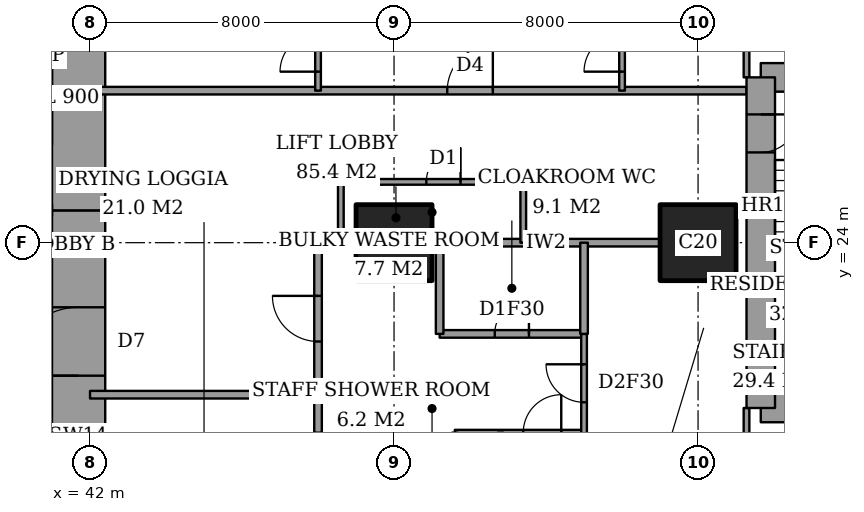
"""IFC4 building model, lengths in metres.
Left out: names, types, materials, properties, quantities, classifications, styles, units other than length and angle.
Written with IfcOpenShell. Run it as: python <this file> out.ifc"""

import sys

from ifc_helpers import new_model, si_unit, direction, frame, frame_2d, origin, origin_2d, place, context, subcontext, project, spatial, rectangle, extrude, element, fill, save


model = new_model("IFC4")
c1 = context("Model", 3, precision=1e-05, world=origin(), true_north=direction((0.0, 1.0)))
c2 = subcontext(c1, "Body", "Model", "MODEL_VIEW")
j1 = project(units=[si_unit("LENGTHUNIT", "METRE"), si_unit("PLANEANGLEUNIT", "RADIAN")], contexts=[c1])
p1 = place(None, origin())
s1 = spatial("IfcSite", under=j1, at=p1, CompositionType="ELEMENT")
p2 = place(p1, origin())
s2 = spatial("IfcBuilding", under=s1, at=p2, CompositionType="ELEMENT")
p3 = place(p2, frame((0.0, 0.0, 150.2)))
s3 = spatial("IfcBuildingStorey", under=s2, at=p3, CompositionType="ELEMENT", Elevation=150.2)
for number, where, z_axis, x_axis in (
    (1, (50.0, 24.0, 0.0), (0.0, 0.0, 1.0), (1.0, 0.0, 0.0)),
    (2, (58.0, 24.0, 0.0), (0.0, 0.0, 1.0), (1.0, 0.0, 0.0)),
):
    element("IfcColumn", number, at=place(p3, frame(where, z_axis=z_axis, x_axis=x_axis)), inside=s3, PredefinedType="COLUMN", context=c2, shape_type="SweptSolid", body=[
        extrude(rectangle(XDim=2.0, YDim=2.0, at=origin_2d()), origin(), (0.0, 0.0, 1.0), 3.6),
    ])
p4 = place(p3, frame((41.7, 13.0, 0.0), z_axis=(0.0, 0.0, 1.0), x_axis=(0.0, 1.0, 0.0)))
e3 = element("IfcWall", 3, at=p4, inside=s3, PredefinedType="SHEAR", context=c2, shape_type="SweptSolid", body=[
    extrude(rectangle(XDim=11.85, YDim=1.4, at=frame_2d((5.925, 0.0))), origin(), (0.0, 0.0, 1.0), 3.6),
])
p5 = place(p4, frame((7.5, 0.0, 0.0)))
e4 = element("IfcOpeningElement", 4, at=p5, cuts=e3, PredefinedType="OPENING", context=c2, shape_type="SweptSolid", body=[
    extrude(rectangle(XDim=1.8, YDim=2.4, at=frame_2d((0.9, 1.2))), frame((0.0, 0.71, 0.0), z_axis=(0.0, -1.0, 0.0), x_axis=(1.0, 0.0, 0.0)), (0.0, 0.0, 1.0), 1.42),
])
p6 = place(p3, frame((41.7, 24.85, 0.0), z_axis=(0.0, 0.0, 1.0), x_axis=(0.0, 1.0, 0.0)))
e5 = element("IfcWall", 5, at=p6, inside=s3, PredefinedType="SHEAR", context=c2, shape_type="SweptSolid", body=[
    extrude(rectangle(XDim=10.15, YDim=1.4, at=frame_2d((5.075, 0.0))), origin(), (0.0, 0.0, 1.0), 3.6),
])
for number, where, z_axis, x_axis in (
    (6, (59.65, 19.65, 0.0), (0.0, 0.0, 1.0), (1.0, 0.0, 0.0)),
    (7, (64.1, 28.35, 0.0), (0.0, 0.0, 1.0), (-1.0, 0.0, 0.0)),
):
    element("IfcWall", number, at=place(p3, frame(where, z_axis=z_axis, x_axis=x_axis)), inside=s3, PredefinedType="SHEAR", context=c2, shape_type="SweptSolid", body=[
        extrude(rectangle(XDim=4.45, YDim=0.75, at=frame_2d((2.225, 0.0))), origin(), (0.0, 0.0, 1.0), 3.6),
    ])
p7 = place(p3, frame((59.65, 28.35, 0.0), z_axis=(0.0, 0.0, 1.0), x_axis=(0.0, -1.0, 0.0)))
e8 = element("IfcWall", 8, at=p7, inside=s3, PredefinedType="SHEAR", context=c2, shape_type="SweptSolid", body=[
    extrude(rectangle(XDim=8.7, YDim=0.75, at=frame_2d((4.35, 0.0))), origin(), (0.0, 0.0, 1.0), 3.6),
])
p8 = place(p7, frame((0.975, 0.0, 0.0)))
e9 = element("IfcOpeningElement", 9, at=p8, cuts=e8, PredefinedType="OPENING", context=c2, shape_type="SweptSolid", body=[
    extrude(rectangle(XDim=1.0, YDim=2.1, at=frame_2d((0.5, 1.05))), frame((0.0, 0.385, 0.0), z_axis=(0.0, -1.0, 0.0), x_axis=(1.0, 0.0, 0.0)), (0.0, 0.0, 1.0), 0.77),
])
p9 = place(p3, frame((51.6, 19.0, 0.0), z_axis=(0.0, 0.0, 1.0), x_axis=(1.0, 0.0, 0.0)))
e10 = element("IfcWall", 10, at=p9, inside=s3, PredefinedType="PARTITIONING", context=c2, shape_type="SweptSolid", body=[
    extrude(rectangle(XDim=3.4, YDim=0.15, at=frame_2d((1.7, 0.0))), origin(), (0.0, 0.0, 1.0), 3.35),
])
p10 = place(p9, frame((1.8, 0.0, 0.0)))
e11 = element("IfcOpeningElement", 11, at=p10, cuts=e10, PredefinedType="OPENING", context=c2, shape_type="SweptSolid", body=[
    extrude(rectangle(XDim=1.0, YDim=2.1, at=frame_2d((0.5, 1.05))), frame((0.0, 0.085, 0.0), z_axis=(0.0, -1.0, 0.0), x_axis=(1.0, 0.0, 0.0)), (0.0, 0.0, 1.0), 0.17),
])
p11 = place(p3, frame((42.0, 20.0, 0.0), z_axis=(0.0, 0.0, 1.0), x_axis=(1.0, 0.0, 0.0)))
e12 = element("IfcWall", 12, at=p11, inside=s3, PredefinedType="PARTITIONING", context=c2, shape_type="SweptSolid", body=[
    extrude(rectangle(XDim=6.0, YDim=0.2, at=frame_2d((3.0, 0.0))), origin(), (0.0, 0.0, 1.0), 3.35),
])
p12 = place(p3, frame((51.2, 21.6, 0.0), z_axis=(0.0, 0.0, 1.0), x_axis=(1.0, 0.0, 0.0)))
e13 = element("IfcWall", 13, at=p12, inside=s3, PredefinedType="PARTITIONING", context=c2, shape_type="SweptSolid", body=[
    extrude(rectangle(XDim=3.8, YDim=0.2, at=frame_2d((1.9, 0.0))), origin(), (0.0, 0.0, 1.0), 3.35),
])
p13 = place(p12, frame((1.45, 0.0, 0.0)))
e14 = element("IfcOpeningElement", 14, at=p13, cuts=e13, PredefinedType="OPENING", context=c2, shape_type="SweptSolid", body=[
    extrude(rectangle(XDim=0.9, YDim=2.1, at=frame_2d((0.45, 1.05))), frame((0.0, 0.11, 0.0), z_axis=(0.0, -1.0, 0.0), x_axis=(1.0, 0.0, 0.0)), (0.0, 0.0, 1.0), 0.22),
])
p14 = place(p3, frame((48.0, 24.0, 0.0), z_axis=(0.0, 0.0, 1.0), x_axis=(1.0, 0.0, 0.0)))
e15 = element("IfcWall", 15, at=p14, inside=s3, PredefinedType="PARTITIONING", context=c2, shape_type="SweptSolid", body=[
    extrude(rectangle(XDim=1.0, YDim=0.2, at=frame_2d((0.5, 0.0))), origin(), (0.0, 0.0, 1.0), 3.35),
])
p15 = place(p3, frame((51.0, 24.0, 0.0), z_axis=(0.0, 0.0, 1.0), x_axis=(1.0, 0.0, 0.0)))
e16 = element("IfcWall", 16, at=p15, inside=s3, PredefinedType="PARTITIONING", context=c2, shape_type="SweptSolid", body=[
    extrude(rectangle(XDim=6.0, YDim=0.2, at=frame_2d((3.0, 0.0))), origin(), (0.0, 0.0, 1.0), 3.35),
])
p16 = place(p3, frame((48.6, 25.6, 0.0), z_axis=(0.0, 0.0, 1.0), x_axis=(1.0, 0.0, 0.0)))
e17 = element("IfcWall", 17, at=p16, inside=s3, PredefinedType="PARTITIONING", context=c2, shape_type="SweptSolid", body=[
    extrude(rectangle(XDim=4.8, YDim=0.15, at=frame_2d((2.4, 0.0))), origin(), (0.0, 0.0, 1.0), 3.35),
])
p17 = place(p16, frame((2.25, 0.0, 0.0)))
e18 = element("IfcOpeningElement", 18, at=p17, cuts=e17, PredefinedType="OPENING", context=c2, shape_type="SweptSolid", body=[
    extrude(rectangle(XDim=0.9, YDim=2.1, at=frame_2d((0.45, 1.05))), frame((0.0, 0.085, 0.0), z_axis=(0.0, -1.0, 0.0), x_axis=(1.0, 0.0, 0.0)), (0.0, 0.0, 1.0), 0.17),
])
p18 = place(p3, frame((42.0, 28.0, 0.0), z_axis=(0.0, 0.0, 1.0), x_axis=(1.0, 0.0, 0.0)))
e19 = element("IfcWall", 19, at=p18, inside=s3, PredefinedType="PARTITIONING", context=c2, shape_type="SweptSolid", body=[
    extrude(rectangle(XDim=17.275, YDim=0.2, at=frame_2d((8.637, 0.0))), origin(), (0.0, 0.0, 1.0), 3.35),
])
p19 = place(p18, frame((9.4, 0.0, 0.0)))
e20 = element("IfcOpeningElement", 20, at=p19, cuts=e19, PredefinedType="OPENING", context=c2, shape_type="SweptSolid", body=[
    extrude(rectangle(XDim=1.2, YDim=2.4, at=frame_2d((0.6, 1.2))), frame((0.0, 0.11, 0.0), z_axis=(0.0, -1.0, 0.0), x_axis=(1.0, 0.0, 0.0)), (0.0, 0.0, 1.0), 0.22),
])
p20 = place(p3, frame((48.0, 19.0, 0.0), z_axis=(0.0, 0.0, 1.0), x_axis=(0.0, 1.0, 0.0)))
e21 = element("IfcWall", 21, at=p20, inside=s3, PredefinedType="PARTITIONING", context=c2, shape_type="SweptSolid", body=[
    extrude(rectangle(XDim=5.0, YDim=0.2, at=frame_2d((2.5, 0.0))), origin(), (0.0, 0.0, 1.0), 3.35),
])
p21 = place(p20, frame((2.4, 0.0, 0.0)))
e22 = element("IfcOpeningElement", 22, at=p21, cuts=e21, PredefinedType="OPENING", context=c2, shape_type="SweptSolid", body=[
    extrude(rectangle(XDim=1.2, YDim=2.4, at=frame_2d((0.6, 1.2))), frame((0.0, 0.11, 0.0), z_axis=(0.0, -1.0, 0.0), x_axis=(1.0, 0.0, 0.0)), (0.0, 0.0, 1.0), 0.22),
])
p22 = place(p3, frame((48.0, 28.0, 0.0), z_axis=(0.0, 0.0, 1.0), x_axis=(0.0, 1.0, 0.0)))
e23 = element("IfcWall", 23, at=p22, inside=s3, PredefinedType="PARTITIONING", context=c2, shape_type="SweptSolid", body=[
    extrude(rectangle(XDim=9.2, YDim=0.15, at=frame_2d((4.6, 0.0))), origin(), (0.0, 0.0, 1.0), 3.35),
])
p23 = place(p22, frame((0.5, 0.0, 0.0)))
e24 = element("IfcOpeningElement", 24, at=p23, cuts=e23, PredefinedType="OPENING", context=c2, shape_type="SweptSolid", body=[
    extrude(rectangle(XDim=1.0, YDim=2.1, at=frame_2d((0.5, 1.05))), frame((0.0, 0.085, 0.0), z_axis=(0.0, -1.0, 0.0), x_axis=(1.0, 0.0, 0.0)), (0.0, 0.0, 1.0), 0.17),
])
p24 = place(p3, frame((48.6, 24.0, 0.0), z_axis=(0.0, 0.0, 1.0), x_axis=(0.0, 1.0, 0.0)))
e25 = element("IfcWall", 25, at=p24, inside=s3, PredefinedType="PARTITIONING", context=c2, shape_type="SweptSolid", body=[
    extrude(rectangle(XDim=1.6, YDim=0.15, at=frame_2d((0.8, 0.0))), origin(), (0.0, 0.0, 1.0), 3.35),
])
p25 = place(p3, frame((51.2, 21.6, 0.0), z_axis=(0.0, 0.0, 1.0), x_axis=(0.0, 1.0, 0.0)))
e26 = element("IfcWall", 26, at=p25, inside=s3, PredefinedType="PARTITIONING", context=c2, shape_type="SweptSolid", body=[
    extrude(rectangle(XDim=2.4, YDim=0.2, at=frame_2d((1.2, 0.0))), origin(), (0.0, 0.0, 1.0), 3.35),
])
p26 = place(p3, frame((51.6, 16.05, 0.0), z_axis=(0.0, 0.0, 1.0), x_axis=(0.0, 1.0, 0.0)))
e27 = element("IfcWall", 27, at=p26, inside=s3, PredefinedType="PARTITIONING", context=c2, shape_type="SweptSolid", body=[
    extrude(rectangle(XDim=2.95, YDim=0.15, at=frame_2d((1.475, 0.0))), origin(), (0.0, 0.0, 1.0), 3.35),
])
p27 = place(p3, frame((53.4, 24.0, 0.0), z_axis=(0.0, 0.0, 1.0), x_axis=(0.0, 1.0, 0.0)))
e28 = element("IfcWall", 28, at=p27, inside=s3, PredefinedType="PARTITIONING", context=c2, shape_type="SweptSolid", body=[
    extrude(rectangle(XDim=1.6, YDim=0.15, at=frame_2d((0.8, 0.0))), origin(), (0.0, 0.0, 1.0), 3.35),
])
p28 = place(p3, frame((55.0, 21.6, 0.0), z_axis=(0.0, 0.0, 1.0), x_axis=(0.0, 1.0, 0.0)))
e29 = element("IfcWall", 29, at=p28, inside=s3, PredefinedType="PARTITIONING", context=c2, shape_type="SweptSolid", body=[
    extrude(rectangle(XDim=2.4, YDim=0.2, at=frame_2d((1.2, 0.0))), origin(), (0.0, 0.0, 1.0), 3.35),
])
p29 = place(p3, frame((55.0, 10.6, 0.0), z_axis=(0.0, 0.0, 1.0), x_axis=(0.0, 1.0, 0.0)))
e30 = element("IfcWall", 30, at=p29, inside=s3, PredefinedType="PARTITIONING", context=c2, shape_type="SweptSolid", body=[
    extrude(rectangle(XDim=11.0, YDim=0.15, at=frame_2d((5.5, 0.0))), origin(), (0.0, 0.0, 1.0), 3.35),
])
p30 = place(p29, frame((9.2, 0.0, 0.0)))
e31 = element("IfcOpeningElement", 31, at=p30, cuts=e30, PredefinedType="OPENING", context=c2, shape_type="SweptSolid", body=[
    extrude(rectangle(XDim=1.0, YDim=2.1, at=frame_2d((0.5, 1.05))), frame((0.0, 0.085, 0.0), z_axis=(0.0, -1.0, 0.0), x_axis=(1.0, 0.0, 0.0)), (0.0, 0.0, 1.0), 0.17),
])
p31 = place(p3, frame((56.0, 28.0, 0.0), z_axis=(0.0, 0.0, 1.0), x_axis=(0.0, 1.0, 0.0)))
e32 = element("IfcWall", 32, at=p31, inside=s3, PredefinedType="PARTITIONING", context=c2, shape_type="SweptSolid", body=[
    extrude(rectangle(XDim=9.2, YDim=0.15, at=frame_2d((4.6, 0.0))), origin(), (0.0, 0.0, 1.0), 3.35),
])
p32 = place(p31, frame((0.5, 0.0, 0.0)))
e33 = element("IfcOpeningElement", 33, at=p32, cuts=e32, PredefinedType="OPENING", context=c2, shape_type="SweptSolid", body=[
    extrude(rectangle(XDim=1.0, YDim=2.1, at=frame_2d((0.5, 1.05))), frame((0.0, 0.085, 0.0), z_axis=(0.0, -1.0, 0.0), x_axis=(1.0, 0.0, 0.0)), (0.0, 0.0, 1.0), 0.17),
])
p33 = place(p3, frame((59.275, 17.2, 0.0), z_axis=(0.0, 0.0, 1.0), x_axis=(0.0, 1.0, 0.0)))
e34 = element("IfcWall", 34, at=p33, inside=s3, PredefinedType="PARTITIONING", context=c2, shape_type="SweptSolid", body=[
    extrude(rectangle(XDim=2.45, YDim=0.15, at=frame_2d((1.225, 0.0))), origin(), (0.0, 0.0, 1.0), 3.35),
])
p34 = place(p33, frame((0.538, 0.0, 0.0)))
e35 = element("IfcOpeningElement", 35, at=p34, cuts=e34, PredefinedType="OPENING", context=c2, shape_type="SweptSolid", body=[
    extrude(rectangle(XDim=1.0, YDim=2.1, at=frame_2d((0.5, 1.05))), frame((0.0, 0.085, 0.0), z_axis=(0.0, -1.0, 0.0), x_axis=(1.0, 0.0, 0.0)), (0.0, 0.0, 1.0), 0.17),
])
p35 = place(p3, frame((59.275, 28.35, 0.0), z_axis=(0.0, 0.0, 1.0), x_axis=(0.0, 1.0, 0.0)))
e36 = element("IfcWall", 36, at=p35, inside=s3, PredefinedType="PARTITIONING", context=c2, shape_type="SweptSolid", body=[
    extrude(rectangle(XDim=2.45, YDim=0.15, at=frame_2d((1.225, 0.0))), origin(), (0.0, 0.0, 1.0), 3.35),
])
p36 = place(p35, frame((0.913, 0.0, 0.0)))
e37 = element("IfcOpeningElement", 37, at=p36, cuts=e36, PredefinedType="OPENING", context=c2, shape_type="SweptSolid", body=[
    extrude(rectangle(XDim=1.0, YDim=2.1, at=frame_2d((0.5, 1.05))), frame((0.0, 0.085, 0.0), z_axis=(0.0, -1.0, 0.0), x_axis=(1.0, 0.0, 0.0)), (0.0, 0.0, 1.0), 0.17),
])
p37 = place(p30, origin())
e38 = element("IfcDoor", 38, at=p37, inside=s3, OperationType="SINGLE_SWING_LEFT", PredefinedType="DOOR", context=c2, shape_type="SweptSolid", body=[
    extrude(rectangle(XDim=1.0, YDim=2.1, at=frame_2d((0.5, 1.05))), frame((0.0, 0.025, 0.0), z_axis=(0.0, -1.0, 0.0), x_axis=(1.0, 0.0, 0.0)), (0.0, 0.0, 1.0), 0.05),
])
fill(e31, e38)
p38 = place(p13, origin())
e39 = element("IfcDoor", 39, at=p38, inside=s3, OperationType="SINGLE_SWING_LEFT", PredefinedType="DOOR", context=c2, shape_type="SweptSolid", body=[
    extrude(rectangle(XDim=0.9, YDim=2.1, at=frame_2d((0.45, 1.05))), frame((0.0, 0.025, 0.0), z_axis=(0.0, -1.0, 0.0), x_axis=(1.0, 0.0, 0.0)), (0.0, 0.0, 1.0), 0.05),
])
fill(e14, e39)
p39 = place(p21, origin())
e40 = element("IfcDoor", 40, at=p39, inside=s3, OperationType="SINGLE_SWING_LEFT", PredefinedType="DOOR", context=c2, shape_type="SweptSolid", body=[
    extrude(rectangle(XDim=1.2, YDim=2.4, at=frame_2d((0.6, 1.2))), frame((0.0, 0.025, 0.0), z_axis=(0.0, -1.0, 0.0), x_axis=(1.0, 0.0, 0.0)), (0.0, 0.0, 1.0), 0.05),
])
fill(e22, e40)
p40 = place(p10, origin())
e41 = element("IfcDoor", 41, at=p40, inside=s3, OperationType="SINGLE_SWING_LEFT", PredefinedType="DOOR", context=c2, shape_type="SweptSolid", body=[
    extrude(rectangle(XDim=1.0, YDim=2.1, at=frame_2d((0.5, 1.05))), frame((0.0, 0.025, 0.0), z_axis=(0.0, -1.0, 0.0), x_axis=(1.0, 0.0, 0.0)), (0.0, 0.0, 1.0), 0.05),
])
fill(e11, e41)
p41 = place(p32, origin())
e42 = element("IfcDoor", 42, at=p41, inside=s3, OperationType="SINGLE_SWING_RIGHT", PredefinedType="DOOR", context=c2, shape_type="SweptSolid", body=[
    extrude(rectangle(XDim=1.0, YDim=2.1, at=frame_2d((0.5, 1.05))), frame((0.0, 0.025, 0.0), z_axis=(0.0, -1.0, 0.0), x_axis=(1.0, 0.0, 0.0)), (0.0, 0.0, 1.0), 0.05),
])
fill(e33, e42)
p42 = place(p19, origin())
e43 = element("IfcDoor", 43, at=p42, inside=s3, OperationType="SINGLE_SWING_LEFT", PredefinedType="DOOR", context=c2, shape_type="SweptSolid", body=[
    extrude(rectangle(XDim=1.2, YDim=2.4, at=frame_2d((0.6, 1.2))), frame((0.0, 0.025, 0.0), z_axis=(0.0, -1.0, 0.0), x_axis=(1.0, 0.0, 0.0)), (0.0, 0.0, 1.0), 0.05),
])
fill(e20, e43)
p43 = place(p23, origin())
e44 = element("IfcDoor", 44, at=p43, inside=s3, OperationType="SINGLE_SWING_RIGHT", PredefinedType="DOOR", context=c2, shape_type="SweptSolid", body=[
    extrude(rectangle(XDim=1.0, YDim=2.1, at=frame_2d((0.5, 1.05))), frame((0.0, 0.025, 0.0), z_axis=(0.0, -1.0, 0.0), x_axis=(1.0, 0.0, 0.0)), (0.0, 0.0, 1.0), 0.05),
])
fill(e24, e44)
p44 = place(p17, origin())
e45 = element("IfcDoor", 45, at=p44, inside=s3, OperationType="SINGLE_SWING_LEFT", PredefinedType="DOOR", context=c2, shape_type="SweptSolid", body=[
    extrude(rectangle(XDim=0.9, YDim=2.1, at=frame_2d((0.45, 1.05))), frame((0.0, 0.025, 0.0), z_axis=(0.0, -1.0, 0.0), x_axis=(1.0, 0.0, 0.0)), (0.0, 0.0, 1.0), 0.05),
])
fill(e18, e45)
p45 = place(p5, origin())
e46 = element("IfcDoor", 46, at=p45, inside=s3, OperationType="DOUBLE_DOOR_DOUBLE_SWING", PredefinedType="DOOR", context=c2, shape_type="SweptSolid", body=[
    extrude(rectangle(XDim=1.8, YDim=2.4, at=frame_2d((0.9, 1.2))), frame((0.0, 0.025, 0.0), z_axis=(0.0, -1.0, 0.0), x_axis=(1.0, 0.0, 0.0)), (0.0, 0.0, 1.0), 0.05),
])
fill(e4, e46)
p46 = place(p8, origin())
e47 = element("IfcDoor", 47, at=p46, inside=s3, OperationType="SINGLE_SWING_RIGHT", PredefinedType="DOOR", context=c2, shape_type="SweptSolid", body=[
    extrude(rectangle(XDim=1.0, YDim=2.1, at=frame_2d((0.5, 1.05))), frame((0.0, 0.025, 0.0), z_axis=(0.0, -1.0, 0.0), x_axis=(1.0, 0.0, 0.0)), (0.0, 0.0, 1.0), 0.05),
])
fill(e9, e47)
save(model, sys.argv[1])
